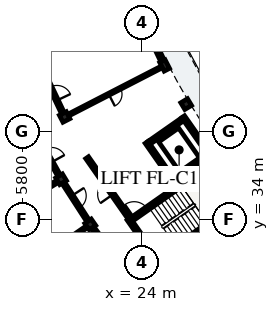
"""IFC4 building model, lengths in metres.
Left out: names, types, materials, properties, quantities, classifications, styles, units other than length and angle.
Written with IfcOpenShell. Run it as: python <this file> out.ifc"""

import sys

from ifc_helpers import new_model, si_unit, direction, frame, frame_2d, origin, origin_2d, place, context, subcontext, project, spatial, rectangle, extrude, element, fill, save


model = new_model("IFC4")
c1 = context("Model", 3, precision=1e-05, world=origin(), true_north=direction((0.0, 1.0)))
c2 = subcontext(c1, "Body", "Model", "MODEL_VIEW")
j1 = project(units=[si_unit("LENGTHUNIT", "METRE"), si_unit("PLANEANGLEUNIT", "RADIAN")], contexts=[c1])
p1 = place(None, origin())
s1 = spatial("IfcSite", under=j1, at=p1, CompositionType="ELEMENT")
p2 = place(p1, origin())
s2 = spatial("IfcBuilding", under=s1, at=p2, CompositionType="ELEMENT")
p3 = place(p2, frame((0.0, 0.0, 29.0)))
s3 = spatial("IfcBuildingStorey", under=s2, at=p3, CompositionType="ELEMENT", Elevation=29.0)
p4 = place(p3, frame((25.114, 31.414, 0.0), z_axis=(0.0, 0.0, 1.0), x_axis=(0.819141541656, 0.573591435374, 0.0)))
e1 = element("IfcWall", 1, at=p4, inside=s3, PredefinedType="SHEAR", context=c2, shape_type="SweptSolid", body=[
    extrude(rectangle(XDim=6.6, YDim=0.25, at=frame_2d((3.3, 0.0))), origin(), (0.0, 0.0, 1.0), 3.11),
])
p5 = place(p3, frame((25.083, 31.24, 0.0), z_axis=(0.0, 0.0, 1.0), x_axis=(-0.573582112484, 0.819148069789, 0.0)))
e2 = element("IfcWall", 2, at=p5, inside=s3, PredefinedType="SHEAR", context=c2, shape_type="SweptSolid", body=[
    extrude(rectangle(XDim=3.42, YDim=0.25, at=frame_2d((1.71, 0.0))), origin(), (0.0, 0.0, 1.0), 3.11),
])
p6 = place(p3, frame((23.296, 34.01, 0.0), z_axis=(0.0, 0.0, 1.0), x_axis=(0.819153711596, 0.573574055182, 0.0)))
e3 = element("IfcWall", 3, at=p6, inside=s3, PredefinedType="SHEAR", context=c2, shape_type="SweptSolid", body=[
    extrude(rectangle(XDim=6.6, YDim=0.25, at=frame_2d((3.3, 0.0))), origin(), (0.0, 0.0, 1.0), 3.11),
])
p7 = place(p6, frame((0.22, 0.0, 0.0)))
e4 = element("IfcOpeningElement", 4, at=p7, cuts=e3, PredefinedType="OPENING", context=c2, shape_type="SweptSolid", body=[
    extrude(rectangle(XDim=1.05, YDim=2.15, at=frame_2d((0.525, 1.075))), frame((0.0, 0.135, 0.0), z_axis=(0.0, -1.0, 0.0), x_axis=(1.0, 0.0, 0.0)), (0.0, 0.0, 1.0), 0.27),
])
p8 = place(p3, frame((26.169, 36.419, 0.0), z_axis=(0.0, 0.0, 1.0), x_axis=(-0.573582966431, 0.819147471839, 0.0)))
e5 = element("IfcWall", 5, at=p8, inside=s3, PredefinedType="SHEAR", context=c2, shape_type="SweptSolid", body=[
    extrude(rectangle(XDim=3.26, YDim=0.23, at=frame_2d((1.63, 0.0))), origin(), (0.0, 0.0, 1.0), 3.11),
])
p9 = place(p8, frame((0.9, 0.0, 0.0)))
e6 = element("IfcOpeningElement", 6, at=p9, cuts=e5, PredefinedType="OPENING", context=c2, shape_type="SweptSolid", body=[
    extrude(rectangle(XDim=1.1, YDim=2.15, at=frame_2d((0.55, 1.075))), frame((0.0, 0.125, 0.0), z_axis=(0.0, -1.0, 0.0), x_axis=(1.0, 0.0, 0.0)), (0.0, 0.0, 1.0), 0.25),
])
p10 = place(p3, frame((28.569, 38.1, 0.0), z_axis=(0.0, 0.0, 1.0), x_axis=(-0.573582966431, 0.819147471839, 0.0)))
e7 = element("IfcWall", 7, at=p10, inside=s3, PredefinedType="SHEAR", context=c2, shape_type="SweptSolid", body=[
    extrude(rectangle(XDim=3.26, YDim=0.23, at=frame_2d((1.63, 0.0))), origin(), (0.0, 0.0, 1.0), 3.11),
])
p11 = place(p3, frame((26.197, 36.579, 0.0), z_axis=(0.0, 0.0, 1.0), x_axis=(0.819159695432, 0.573565509231, 0.0)))
e8 = element("IfcWall", 8, at=p11, inside=s3, PredefinedType="SHEAR", context=c2, shape_type="SweptSolid", body=[
    extrude(rectangle(XDim=2.7, YDim=0.23, at=frame_2d((1.35, 0.0))), origin(), (0.0, 0.0, 1.0), 3.11),
])
p12 = place(p3, frame((24.459, 39.061, 0.0), z_axis=(0.0, 0.0, 1.0), x_axis=(0.819189439894, 0.573523026186, 0.0)))
e9 = element("IfcWall", 9, at=p12, inside=s3, PredefinedType="SHEAR", context=c2, shape_type="SweptSolid", body=[
    extrude(rectangle(XDim=2.7, YDim=0.23, at=frame_2d((1.35, 0.0))), origin(), (0.0, 0.0, 1.0), 3.11),
])
p13 = place(p3, frame((25.483, 44.147, 0.0), z_axis=(0.0, 0.0, 1.0), x_axis=(-0.889017141486, -0.457873915117, 0.0)))
e10 = element("IfcColumn", 10, at=p13, inside=s3, PredefinedType="PILASTER", context=c2, shape_type="SweptSolid", body=[
    extrude(rectangle(XDim=0.39, YDim=0.63, at=origin_2d()), origin(), (0.0, 0.0, 1.0), 3.115),
])
for number, where, z_axis, x_axis in (
    (11, (18.905, 40.759, 0.0), (0.0, 0.0, 1.0), (-0.889, -0.458, 0.0)),
    (12, (26.899, 41.606, 0.0), (0.0, 0.0, 1.0), (-0.857, -0.515, 0.0)),
    (13, (18.67, 36.662, 0.0), (0.0, 0.0, 1.0), (-0.857, -0.515, 0.0)),
    (14, (20.59, 33.692, 0.0), (0.0, 0.0, 1.0), (-0.822, -0.57, 0.0)),
):
    element("IfcColumn", number, at=place(p3, frame(where, z_axis=z_axis, x_axis=x_axis)), inside=s3, PredefinedType="COLUMN", context=c2, shape_type="SweptSolid", body=[
        extrude(rectangle(XDim=0.51, YDim=0.51, at=origin_2d()), origin(), (0.0, 0.0, 1.0), 3.115),
    ])
p14 = place(p3, frame((24.333, 46.572, 0.0), z_axis=(0.0, 0.0, 1.0), x_axis=(0.428623769132, -0.90348307374, 0.0)))
e15 = element("IfcWall", 15, at=p14, inside=s3, PredefinedType="SOLIDWALL", context=c2, shape_type="SweptSolid", body=[
    extrude(rectangle(XDim=2.519, YDim=0.245, at=frame_2d((1.259, 0.0))), origin(), (0.0, 0.0, 1.0), 2.355),
])
p15 = place(p14, frame((0.459, 0.0, 0.55)))
e16 = element("IfcOpeningElement", 16, at=p15, cuts=e15, PredefinedType="OPENING", context=c2, shape_type="SweptSolid", body=[
    extrude(rectangle(XDim=1.6, YDim=1.535, at=frame_2d((0.8, 0.768))), frame((0.0, 0.133, 0.0), z_axis=(0.0, -1.0, 0.0), x_axis=(1.0, 0.0, 0.0)), (0.0, 0.0, 1.0), 0.265),
])
p16 = place(p3, frame((23.195, 34.068, 0.0), z_axis=(0.0, 0.0, 1.0), x_axis=(-0.573572687386, 0.819154669329, 0.0)))
e17 = element("IfcWall", 17, at=p16, inside=s3, PredefinedType="PARTITIONING", context=c2, shape_type="SweptSolid", body=[
    extrude(rectangle(XDim=4.9, YDim=0.22, at=frame_2d((2.45, 0.0))), origin(), (0.0, 0.0, 1.0), 2.34),
])
p17 = place(p16, frame((1.95, 0.0, 0.0)))
e18 = element("IfcOpeningElement", 18, at=p17, cuts=e17, PredefinedType="OPENING", context=c2, shape_type="SweptSolid", body=[
    extrude(rectangle(XDim=1.0, YDim=2.15, at=frame_2d((0.5, 1.075))), frame((0.0, 0.12, 0.0), z_axis=(0.0, -1.0, 0.0), x_axis=(1.0, 0.0, 0.0)), (0.0, 0.0, 1.0), 0.24),
])
p18 = place(p3, frame((17.6, 43.509, 0.0), z_axis=(0.0, 0.0, 1.0), x_axis=(0.428550049392, -0.903518043631, 0.0)))
e19 = element("IfcWall", 19, at=p18, inside=s3, PredefinedType="PARTITIONING", context=c2, shape_type="SweptSolid", body=[
    extrude(rectangle(XDim=2.693, YDim=0.195, at=frame_2d((1.346, 0.0))), origin(), (0.0, 0.0, 1.0), 2.37),
])
p19 = place(p18, frame((0.852, 0.0, 0.0)))
e20 = element("IfcOpeningElement", 20, at=p19, cuts=e19, PredefinedType="OPENING", context=c2, shape_type="SweptSolid", body=[
    extrude(rectangle(XDim=0.99, YDim=2.16, at=frame_2d((0.495, 1.08))), frame((0.0, 0.107, 0.0), z_axis=(0.0, -1.0, 0.0), x_axis=(1.0, 0.0, 0.0)), (0.0, 0.0, 1.0), 0.215),
])
p20 = place(p3, frame((25.128, 43.964, 0.0), z_axis=(0.0, 0.0, 1.0), x_axis=(-0.889022010753, -0.457864460727, 0.0)))
e21 = element("IfcWall", 21, at=p20, inside=s3, PredefinedType="PARTITIONING", context=c2, shape_type="SweptSolid", body=[
    extrude(rectangle(XDim=6.6, YDim=0.125, at=frame_2d((3.3, 0.0))), origin(), (0.0, 0.0, 1.0), 2.37),
])
p21 = place(p20, frame((2.865, 0.0, 0.0)))
e22 = element("IfcOpeningElement", 22, at=p21, cuts=e21, PredefinedType="OPENING", context=c2, shape_type="SweptSolid", body=[
    extrude(rectangle(XDim=0.87, YDim=2.08, at=frame_2d((0.435, 1.04))), frame((0.0, 0.073, 0.0), z_axis=(0.0, -1.0, 0.0), x_axis=(1.0, 0.0, 0.0)), (0.0, 0.0, 1.0), 0.145),
])
p22 = place(p3, frame((17.119, 39.446, 0.0), z_axis=(0.0, 0.0, 1.0), x_axis=(0.48673124079, -0.8735517725, 0.0)))
e23 = element("IfcWall", 23, at=p22, inside=s3, PredefinedType="PARTITIONING", context=c2, shape_type="SweptSolid", body=[
    extrude(rectangle(XDim=2.837, YDim=0.195, at=frame_2d((1.418, 0.0))), origin(), (0.0, 0.0, 1.0), 2.37),
])
p23 = place(p22, frame((0.934, 0.0, 0.0)))
e24 = element("IfcOpeningElement", 24, at=p23, cuts=e23, PredefinedType="OPENING", context=c2, shape_type="SweptSolid", body=[
    extrude(rectangle(XDim=0.97, YDim=2.15, at=frame_2d((0.485, 1.075))), frame((0.0, 0.107, 0.0), z_axis=(0.0, -1.0, 0.0), x_axis=(1.0, 0.0, 0.0)), (0.0, 0.0, 1.0), 0.215),
])
p24 = place(p3, frame((18.327, 36.456, 0.0), z_axis=(0.0, 0.0, 1.0), x_axis=(-0.857139805444, -0.515083831937, 0.0)))
e25 = element("IfcWall", 25, at=p24, inside=s3, PredefinedType="PARTITIONING", context=c2, shape_type="SweptSolid", body=[
    extrude(rectangle(XDim=4.7, YDim=0.175, at=frame_2d((2.35, 0.0))), origin(), (0.0, 0.0, 1.0), 2.37),
])
p25 = place(p3, frame((18.86, 36.368, 0.0), z_axis=(0.0, 0.0, 1.0), x_axis=(0.542787304957, -0.83987019329, 0.0)))
e26 = element("IfcWall", 26, at=p25, inside=s3, PredefinedType="PARTITIONING", context=c2, shape_type="SweptSolid", body=[
    extrude(rectangle(XDim=2.837, YDim=0.195, at=frame_2d((1.418, 0.0))), origin(), (0.0, 0.0, 1.0), 2.37),
])
p26 = place(p25, frame((0.944, 0.0, 0.0)))
e27 = element("IfcOpeningElement", 27, at=p26, cuts=e26, PredefinedType="OPENING", context=c2, shape_type="SweptSolid", body=[
    extrude(rectangle(XDim=0.95, YDim=2.13, at=frame_2d((0.475, 1.065))), frame((0.0, 0.107, 0.0), z_axis=(0.0, -1.0, 0.0), x_axis=(1.0, 0.0, 0.0)), (0.0, 0.0, 1.0), 0.215),
])
p27 = place(p3, frame((20.261, 33.464, 0.0), z_axis=(0.0, 0.0, 1.0), x_axis=(-0.821638260647, -0.570009270663, 0.0)))
e28 = element("IfcWall", 28, at=p27, inside=s3, PredefinedType="PLUMBINGWALL", context=c2, shape_type="SweptSolid", body=[
    extrude(rectangle(XDim=4.7, YDim=0.14, at=frame_2d((2.35, 0.0))), origin(), (0.0, 0.0, 1.0), 2.37),
])
p28 = place(p27, frame((1.925, 0.0, 0.0)))
e29 = element("IfcOpeningElement", 29, at=p28, cuts=e28, PredefinedType="OPENING", context=c2, shape_type="SweptSolid", body=[
    extrude(rectangle(XDim=0.85, YDim=2.05, at=frame_2d((0.425, 1.025))), frame((0.0, 0.08, 0.0), z_axis=(0.0, -1.0, 0.0), x_axis=(1.0, 0.0, 0.0)), (0.0, 0.0, 1.0), 0.16),
])
p29 = place(p3, frame((20.799, 33.411, 0.0), z_axis=(0.0, 0.0, 1.0), x_axis=(0.596552136601, -0.802574325727, 0.0)))
e30 = element("IfcWall", 30, at=p29, inside=s3, PredefinedType="PARTITIONING", context=c2, shape_type="SweptSolid", body=[
    extrude(rectangle(XDim=2.837, YDim=0.195, at=frame_2d((1.418, 0.0))), origin(), (0.0, 0.0, 1.0), 2.37),
])
p30 = place(p29, frame((0.954, 0.0, 0.0)))
e31 = element("IfcOpeningElement", 31, at=p30, cuts=e30, PredefinedType="OPENING", context=c2, shape_type="SweptSolid", body=[
    extrude(rectangle(XDim=0.93, YDim=2.12, at=frame_2d((0.465, 1.06))), frame((0.0, 0.107, 0.0), z_axis=(0.0, -1.0, 0.0), x_axis=(1.0, 0.0, 0.0)), (0.0, 0.0, 1.0), 0.215),
])
p31 = place(p3, frame((31.801, 34.344, 0.0), z_axis=(0.0, 0.0, 1.0), x_axis=(-0.74023124711, -0.672352363573, 0.0)))
e32 = element("IfcWall", 32, at=p31, inside=s3, PredefinedType="PARTITIONING", context=c2, shape_type="SweptSolid", body=[
    extrude(rectangle(XDim=6.6, YDim=0.125, at=frame_2d((3.3, 0.0))), origin(), (0.0, 0.0, 1.0), 2.37),
])
p32 = place(p31, frame((2.845, 0.0, 0.0)))
e33 = element("IfcOpeningElement", 33, at=p32, cuts=e32, PredefinedType="OPENING", context=c2, shape_type="SweptSolid", body=[
    extrude(rectangle(XDim=0.91, YDim=2.1, at=frame_2d((0.455, 1.05))), frame((0.0, 0.073, 0.0), z_axis=(0.0, -1.0, 0.0), x_axis=(1.0, 0.0, 0.0)), (0.0, 0.0, 1.0), 0.145),
])
p33 = place(p15, origin())
e34 = element("IfcWindow", 34, at=p33, inside=s3, PartitioningType="SINGLE_PANEL", PredefinedType="WINDOW", context=c2, shape_type="SweptSolid", body=[
    extrude(rectangle(XDim=1.6, YDim=1.535, at=frame_2d((0.8, 0.768))), frame((0.0, 0.03, 0.0), z_axis=(0.0, -1.0, 0.0), x_axis=(1.0, 0.0, 0.0)), (0.0, 0.0, 1.0), 0.06),
])
fill(e16, e34)
p34 = place(p7, origin())
e35 = element("IfcDoor", 35, at=p34, inside=s3, OperationType="SINGLE_SWING_LEFT", PredefinedType="DOOR", context=c2, shape_type="SweptSolid", body=[
    extrude(rectangle(XDim=1.05, YDim=2.15, at=frame_2d((0.525, 1.075))), frame((0.0, 0.025, 0.0), z_axis=(0.0, -1.0, 0.0), x_axis=(1.0, 0.0, 0.0)), (0.0, 0.0, 1.0), 0.05),
])
fill(e4, e35)
p35 = place(p9, origin())
e36 = element("IfcDoor", 36, at=p35, inside=s3, OperationType="DOUBLE_DOOR_SLIDING", PredefinedType="DOOR", context=c2, shape_type="SweptSolid", body=[
    extrude(rectangle(XDim=1.1, YDim=2.15, at=frame_2d((0.55, 1.075))), frame((0.0, 0.025, 0.0), z_axis=(0.0, -1.0, 0.0), x_axis=(1.0, 0.0, 0.0)), (0.0, 0.0, 1.0), 0.05),
])
fill(e6, e36)
p36 = place(p17, origin())
e37 = element("IfcDoor", 37, at=p36, inside=s3, OperationType="SINGLE_SWING_LEFT", PredefinedType="DOOR", context=c2, shape_type="SweptSolid", body=[
    extrude(rectangle(XDim=1.0, YDim=2.15, at=frame_2d((0.5, 1.075))), frame((0.0, 0.025, 0.0), z_axis=(0.0, -1.0, 0.0), x_axis=(1.0, 0.0, 0.0)), (0.0, 0.0, 1.0), 0.05),
])
fill(e18, e37)
p37 = place(p19, origin())
e38 = element("IfcDoor", 38, at=p37, inside=s3, OperationType="SINGLE_SWING_RIGHT", PredefinedType="DOOR", context=c2, shape_type="SweptSolid", body=[
    extrude(rectangle(XDim=0.99, YDim=2.16, at=frame_2d((0.495, 1.08))), frame((0.0, 0.025, 0.0), z_axis=(0.0, -1.0, 0.0), x_axis=(1.0, 0.0, 0.0)), (0.0, 0.0, 1.0), 0.05),
])
fill(e20, e38)
p38 = place(p21, origin())
e39 = element("IfcDoor", 39, at=p38, inside=s3, OperationType="SINGLE_SWING_RIGHT", PredefinedType="DOOR", context=c2, shape_type="SweptSolid", body=[
    extrude(rectangle(XDim=0.87, YDim=2.08, at=frame_2d((0.435, 1.04))), frame((0.0, 0.025, 0.0), z_axis=(0.0, -1.0, 0.0), x_axis=(1.0, 0.0, 0.0)), (0.0, 0.0, 1.0), 0.05),
])
fill(e22, e39)
p39 = place(p26, origin())
e40 = element("IfcDoor", 40, at=p39, inside=s3, OperationType="SINGLE_SWING_LEFT", PredefinedType="DOOR", context=c2, shape_type="SweptSolid", body=[
    extrude(rectangle(XDim=0.95, YDim=2.13, at=frame_2d((0.475, 1.065))), frame((0.0, 0.025, 0.0), z_axis=(0.0, -1.0, 0.0), x_axis=(1.0, 0.0, 0.0)), (0.0, 0.0, 1.0), 0.05),
])
fill(e27, e40)
save(model, sys.argv[1])
